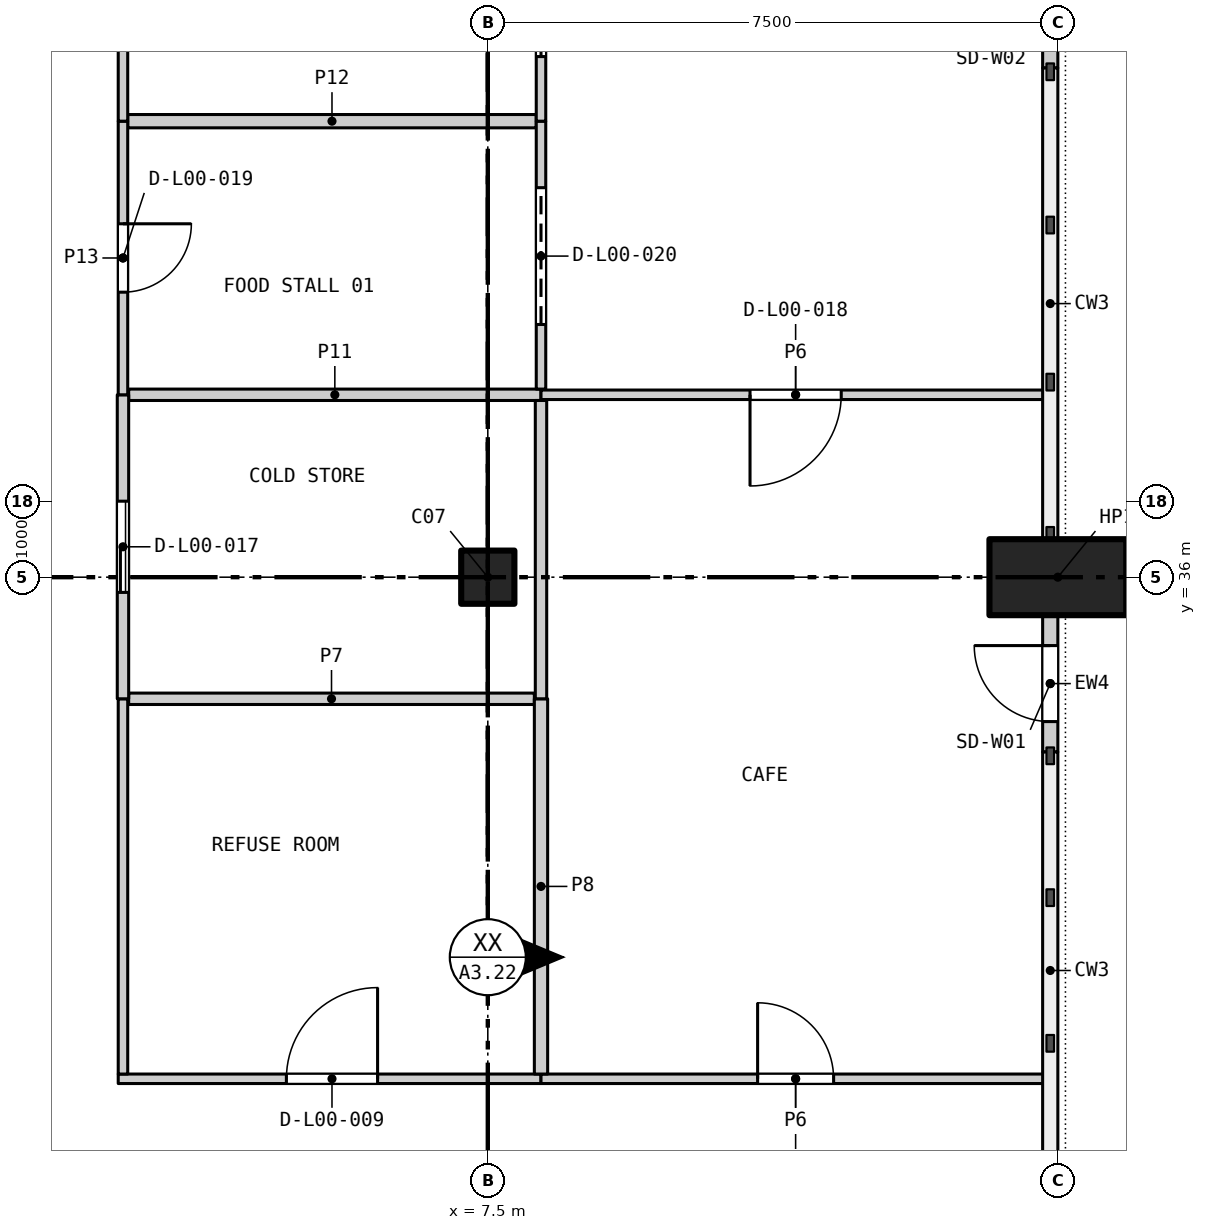
"""IFC4 building model, lengths in metres.
Left out: names, types, materials, properties, quantities, classifications, styles, units other than length and angle.
Written with IfcOpenShell. Run it as: python <this file> out.ifc"""

import sys

from ifc_helpers import new_model, si_unit, direction, frame, frame_2d, origin, origin_2d, place, context, subcontext, project, spatial, rectangle, extrude, element, fill, save


model = new_model("IFC4")
c1 = context("Model", 3, precision=1e-05, world=origin(), true_north=direction((0.0, 1.0)))
c2 = subcontext(c1, "Body", "Model", "MODEL_VIEW")
j1 = project(units=[si_unit("LENGTHUNIT", "METRE"), si_unit("PLANEANGLEUNIT", "RADIAN")], contexts=[c1])
p1 = place(None, origin())
s1 = spatial("IfcSite", under=j1, at=p1, CompositionType="ELEMENT")
p2 = place(p1, origin())
s2 = spatial("IfcBuilding", under=s1, at=p2, CompositionType="ELEMENT")
p3 = place(p2, origin())
s3 = spatial("IfcBuildingStorey", under=s2, at=p3, CompositionType="ELEMENT", Elevation=0.0)
p4 = place(p3, frame((7.5, 36.0, 0.0), z_axis=(0.0, 0.0, 1.0), x_axis=(1.0, 0.0, 0.0)))
e1 = element("IfcColumn", 1, at=p4, inside=s3, PredefinedType="COLUMN", context=c2, shape_type="SweptSolid", body=[
    extrude(rectangle(XDim=0.7, YDim=0.7, at=origin_2d()), origin(), (0.0, 0.0, 1.0), 6.0),
])
p5 = place(p3, frame((15.0, 36.0, 0.0), z_axis=(0.0, 0.0, 1.0), x_axis=(1.0, 0.0, 0.0)))
e2 = element("IfcColumn", 2, at=p5, inside=s3, PredefinedType="COLUMN", context=c2, shape_type="SweptSolid", body=[
    extrude(rectangle(XDim=1.8, YDim=1.0, at=origin_2d()), origin(), (0.0, 0.0, 1.0), 6.0),
])
p6 = place(p3, frame((14.9, 35.5, 0.0), z_axis=(0.0, 0.0, 1.0), x_axis=(0.0, -1.0, 0.0)))
e3 = element("IfcWall", 3, at=p6, inside=s3, PredefinedType="PARTITIONING", context=c2, shape_type="SweptSolid", body=[
    extrude(rectangle(XDim=1.8, YDim=0.2, at=frame_2d((0.9, 0.0))), origin(), (0.0, 0.0, 1.0), 5.8),
])
p7 = place(p6, frame((0.4, 0.0, 0.0)))
e4 = element("IfcOpeningElement", 4, at=p7, cuts=e3, PredefinedType="OPENING", context=c2, shape_type="SweptSolid", body=[
    extrude(rectangle(XDim=1.0, YDim=2.4, at=frame_2d((0.5, 1.2))), frame((0.0, 0.11, 0.0), z_axis=(0.0, -1.0, 0.0), x_axis=(1.0, 0.0, 0.0)), (0.0, 0.0, 1.0), 0.22),
])
p8 = place(p3, frame((14.9, 44.5, 0.0), z_axis=(0.0, 0.0, 1.0), x_axis=(0.0, -1.0, 0.0)))
e5 = element("IfcWall", 5, at=p8, inside=s3, PredefinedType="PARTITIONING", context=c2, shape_type="SweptSolid", body=[
    extrude(rectangle(XDim=1.8, YDim=0.2, at=frame_2d((0.9, 0.0))), origin(), (0.0, 0.0, 1.0), 5.8),
])
p9 = place(p8, frame((0.4, 0.0, 0.0)))
e6 = element("IfcOpeningElement", 6, at=p9, cuts=e5, PredefinedType="OPENING", context=c2, shape_type="SweptSolid", body=[
    extrude(rectangle(XDim=1.0, YDim=2.4, at=frame_2d((0.5, 1.2))), frame((0.0, 0.11, 0.0), z_axis=(0.0, -1.0, 0.0), x_axis=(1.0, 0.0, 0.0)), (0.0, 0.0, 1.0), 0.22),
])
p10 = place(p3, frame((2.637, 29.4, 0.0), z_axis=(0.0, 0.0, 1.0), x_axis=(1.0, 0.0, 0.0)))
e7 = element("IfcWall", 7, at=p10, inside=s3, PredefinedType="PARTITIONING", context=c2, shape_type="SweptSolid", body=[
    extrude(rectangle(XDim=5.562, YDim=0.125, at=frame_2d((2.781, 0.0))), origin(), (0.0, 0.0, 1.0), 5.8),
])
p11 = place(p10, frame((2.212, 0.0, 0.0)))
e8 = element("IfcOpeningElement", 8, at=p11, cuts=e7, PredefinedType="OPENING", context=c2, shape_type="SweptSolid", body=[
    extrude(rectangle(XDim=1.2, YDim=2.1, at=frame_2d((0.6, 1.05))), frame((0.0, 0.073, 0.0), z_axis=(0.0, -1.0, 0.0), x_axis=(1.0, 0.0, 0.0)), (0.0, 0.0, 1.0), 0.145),
])
p12 = place(p3, frame((8.2, 29.4, 0.0), z_axis=(0.0, 0.0, 1.0), x_axis=(1.0, 0.0, 0.0)))
e9 = element("IfcWall", 9, at=p12, inside=s3, PredefinedType="PARTITIONING", context=c2, shape_type="SweptSolid", body=[
    extrude(rectangle(XDim=6.7, YDim=0.125, at=frame_2d((3.35, 0.0))), origin(), (0.0, 0.0, 1.0), 5.8),
])
p13 = place(p12, frame((2.85, 0.0, 0.0)))
e10 = element("IfcOpeningElement", 10, at=p13, cuts=e9, PredefinedType="OPENING", context=c2, shape_type="SweptSolid", body=[
    extrude(rectangle(XDim=1.0, YDim=2.1, at=frame_2d((0.5, 1.05))), frame((0.0, 0.073, 0.0), z_axis=(0.0, -1.0, 0.0), x_axis=(1.0, 0.0, 0.0)), (0.0, 0.0, 1.0), 0.145),
])
p14 = place(p3, frame((2.775, 34.4, 0.0), z_axis=(0.0, 0.0, 1.0), x_axis=(1.0, 0.0, 0.0)))
e11 = element("IfcWall", 11, at=p14, inside=s3, PredefinedType="PARTITIONING", context=c2, shape_type="SweptSolid", body=[
    extrude(rectangle(XDim=5.338, YDim=0.15, at=frame_2d((2.669, 0.0))), origin(), (0.0, 0.0, 1.0), 5.8),
])
p15 = place(p3, frame((2.775, 38.4, 0.0), z_axis=(0.0, 0.0, 1.0), x_axis=(1.0, 0.0, 0.0)))
e12 = element("IfcWall", 12, at=p15, inside=s3, PredefinedType="PARTITIONING", context=c2, shape_type="SweptSolid", body=[
    extrude(rectangle(XDim=5.425, YDim=0.15, at=frame_2d((2.712, 0.0))), origin(), (0.0, 0.0, 1.0), 3.0),
])
p16 = place(p3, frame((8.2, 38.4, 0.0), z_axis=(0.0, 0.0, 1.0), x_axis=(1.0, 0.0, 0.0)))
e13 = element("IfcWall", 13, at=p16, inside=s3, PredefinedType="PARTITIONING", context=c2, shape_type="SweptSolid", body=[
    extrude(rectangle(XDim=6.7, YDim=0.125, at=frame_2d((3.35, 0.0))), origin(), (0.0, 0.0, 1.0), 5.8),
])
p17 = place(p16, frame((2.75, 0.0, 0.0)))
e14 = element("IfcOpeningElement", 14, at=p17, cuts=e13, PredefinedType="OPENING", context=c2, shape_type="SweptSolid", body=[
    extrude(rectangle(XDim=1.2, YDim=2.1, at=frame_2d((0.6, 1.05))), frame((0.0, 0.073, 0.0), z_axis=(0.0, -1.0, 0.0), x_axis=(1.0, 0.0, 0.0)), (0.0, 0.0, 1.0), 0.145),
])
p18 = place(p3, frame((2.762, 42.0, 0.0), z_axis=(0.0, 0.0, 1.0), x_axis=(1.0, 0.0, 0.0)))
e15 = element("IfcWall", 15, at=p18, inside=s3, PredefinedType="PARTITIONING", context=c2, shape_type="SweptSolid", body=[
    extrude(rectangle(XDim=5.375, YDim=0.175, at=frame_2d((2.688, 0.0))), origin(), (0.0, 0.0, 1.0), 3.0),
])
p19 = place(p3, frame((2.7, 29.462, 0.0), z_axis=(0.0, 0.0, 1.0), x_axis=(0.0, 1.0, 0.0)))
e16 = element("IfcWall", 16, at=p19, inside=s3, PredefinedType="PARTITIONING", context=c2, shape_type="SweptSolid", body=[
    extrude(rectangle(XDim=4.938, YDim=0.125, at=frame_2d((2.469, 0.0))), origin(), (0.0, 0.0, 1.0), 5.8),
])
p20 = place(p3, frame((2.7, 34.4, 0.0), z_axis=(0.0, 0.0, 1.0), x_axis=(0.0, 1.0, 0.0)))
e17 = element("IfcWall", 17, at=p20, inside=s3, PredefinedType="PARTITIONING", context=c2, shape_type="SweptSolid", body=[
    extrude(rectangle(XDim=4.0, YDim=0.15, at=frame_2d((2.0, 0.0))), origin(), (0.0, 0.0, 1.0), 5.8),
])
p21 = place(p20, frame((1.4, 0.0, 0.0)))
e18 = element("IfcOpeningElement", 18, at=p21, cuts=e17, PredefinedType="OPENING", context=c2, shape_type="SweptSolid", body=[
    extrude(rectangle(XDim=1.2, YDim=2.4, at=frame_2d((0.6, 1.2))), frame((0.0, 0.085, 0.0), z_axis=(0.0, -1.0, 0.0), x_axis=(1.0, 0.0, 0.0)), (0.0, 0.0, 1.0), 0.17),
])
p22 = place(p3, frame((2.7, 38.4, 0.0), z_axis=(0.0, 0.0, 1.0), x_axis=(0.0, 1.0, 0.0)))
e19 = element("IfcWall", 19, at=p22, inside=s3, PredefinedType="PARTITIONING", context=c2, shape_type="SweptSolid", body=[
    extrude(rectangle(XDim=3.6, YDim=0.125, at=frame_2d((1.8, 0.0))), origin(), (0.0, 0.0, 1.0), 3.0),
])
p23 = place(p22, frame((1.35, 0.0, 0.0)))
e20 = element("IfcOpeningElement", 20, at=p23, cuts=e19, PredefinedType="OPENING", context=c2, shape_type="SweptSolid", body=[
    extrude(rectangle(XDim=0.9, YDim=2.1, at=frame_2d((0.45, 1.05))), frame((0.0, 0.073, 0.0), z_axis=(0.0, -1.0, 0.0), x_axis=(1.0, 0.0, 0.0)), (0.0, 0.0, 1.0), 0.145),
])
p24 = place(p3, frame((2.7, 42.0, 0.0), z_axis=(0.0, 0.0, 1.0), x_axis=(0.0, 1.0, 0.0)))
e21 = element("IfcWall", 21, at=p24, inside=s3, PredefinedType="PARTITIONING", context=c2, shape_type="SweptSolid", body=[
    extrude(rectangle(XDim=3.6, YDim=0.125, at=frame_2d((1.8, 0.0))), origin(), (0.0, 0.0, 1.0), 3.0),
])
p25 = place(p24, frame((1.35, 0.0, 0.0)))
e22 = element("IfcOpeningElement", 22, at=p25, cuts=e21, PredefinedType="OPENING", context=c2, shape_type="SweptSolid", body=[
    extrude(rectangle(XDim=0.9, YDim=2.1, at=frame_2d((0.45, 1.05))), frame((0.0, 0.073, 0.0), z_axis=(0.0, -1.0, 0.0), x_axis=(1.0, 0.0, 0.0)), (0.0, 0.0, 1.0), 0.145),
])
p26 = place(p3, frame((8.2, 29.462, 0.0), z_axis=(0.0, 0.0, 1.0), x_axis=(0.0, 1.0, 0.0)))
e23 = element("IfcWall", 23, at=p26, inside=s3, PredefinedType="PARTITIONING", context=c2, shape_type="SweptSolid", body=[
    extrude(rectangle(XDim=4.938, YDim=0.175, at=frame_2d((2.469, 0.0))), origin(), (0.0, 0.0, 1.0), 5.8),
])
p27 = place(p3, frame((8.2, 34.4, 0.0), z_axis=(0.0, 0.0, 1.0), x_axis=(0.0, 1.0, 0.0)))
e24 = element("IfcWall", 24, at=p27, inside=s3, PredefinedType="PARTITIONING", context=c2, shape_type="SweptSolid", body=[
    extrude(rectangle(XDim=3.925, YDim=0.15, at=frame_2d((1.962, 0.0))), origin(), (0.0, 0.0, 1.0), 5.8),
])
p28 = place(p3, frame((8.2, 38.475, 0.0), z_axis=(0.0, 0.0, 1.0), x_axis=(0.0, 1.0, 0.0)))
e25 = element("IfcWall", 25, at=p28, inside=s3, PredefinedType="PARTITIONING", context=c2, shape_type="SweptSolid", body=[
    extrude(rectangle(XDim=3.525, YDim=0.125, at=frame_2d((1.762, 0.0))), origin(), (0.0, 0.0, 1.0), 3.0),
])
p29 = place(p28, frame((0.85, 0.0, 0.0)))
e26 = element("IfcOpeningElement", 26, at=p29, cuts=e25, PredefinedType="OPENING", context=c2, shape_type="SweptSolid", body=[
    extrude(rectangle(XDim=1.8, YDim=2.4, at=frame_2d((0.9, 1.2))), frame((0.0, 0.073, 0.0), z_axis=(0.0, -1.0, 0.0), x_axis=(1.0, 0.0, 0.0)), (0.0, 0.0, 1.0), 0.145),
])
p30 = place(p3, frame((8.2, 42.0, 0.0), z_axis=(0.0, 0.0, 1.0), x_axis=(0.0, 1.0, 0.0)))
e27 = element("IfcWall", 27, at=p30, inside=s3, PredefinedType="PARTITIONING", context=c2, shape_type="SweptSolid", body=[
    extrude(rectangle(XDim=3.6, YDim=0.125, at=frame_2d((1.8, 0.0))), origin(), (0.0, 0.0, 1.0), 3.0),
])
p31 = place(p30, frame((0.85, 0.0, 0.0)))
e28 = element("IfcOpeningElement", 28, at=p31, cuts=e27, PredefinedType="OPENING", context=c2, shape_type="SweptSolid", body=[
    extrude(rectangle(XDim=1.8, YDim=2.4, at=frame_2d((0.9, 1.2))), frame((0.0, 0.073, 0.0), z_axis=(0.0, -1.0, 0.0), x_axis=(1.0, 0.0, 0.0)), (0.0, 0.0, 1.0), 0.145),
])
p32 = place(p7, frame((1.0, 0.0, 0.0), z_axis=(0.0, 0.0, 1.0), x_axis=(-1.0, 0.0, 0.0)))
e29 = element("IfcDoor", 29, at=p32, inside=s3, OperationType="SINGLE_SWING_RIGHT", PredefinedType="DOOR", context=c2, shape_type="SweptSolid", body=[
    extrude(rectangle(XDim=1.0, YDim=2.4, at=frame_2d((0.5, 1.2))), frame((0.0, 0.025, 0.0), z_axis=(0.0, -1.0, 0.0), x_axis=(1.0, 0.0, 0.0)), (0.0, 0.0, 1.0), 0.05),
])
fill(e4, e29)
p33 = place(p11, origin())
e30 = element("IfcDoor", 30, at=p33, inside=s3, OperationType="SINGLE_SWING_RIGHT", PredefinedType="DOOR", context=c2, shape_type="SweptSolid", body=[
    extrude(rectangle(XDim=1.2, YDim=2.1, at=frame_2d((0.6, 1.05))), frame((0.0, 0.025, 0.0), z_axis=(0.0, -1.0, 0.0), x_axis=(1.0, 0.0, 0.0)), (0.0, 0.0, 1.0), 0.05),
])
fill(e8, e30)
p34 = place(p13, origin())
e31 = element("IfcDoor", 31, at=p34, inside=s3, OperationType="SINGLE_SWING_LEFT", PredefinedType="DOOR", context=c2, shape_type="SweptSolid", body=[
    extrude(rectangle(XDim=1.0, YDim=2.1, at=frame_2d((0.5, 1.05))), frame((0.0, 0.025, 0.0), z_axis=(0.0, -1.0, 0.0), x_axis=(1.0, 0.0, 0.0)), (0.0, 0.0, 1.0), 0.05),
])
fill(e10, e31)
p35 = place(p21, origin())
e32 = element("IfcDoor", 32, at=p35, inside=s3, OperationType="SLIDING_TO_LEFT", PredefinedType="DOOR", context=c2, shape_type="SweptSolid", body=[
    extrude(rectangle(XDim=1.2, YDim=2.4, at=frame_2d((0.6, 1.2))), frame((0.0, 0.025, 0.0), z_axis=(0.0, -1.0, 0.0), x_axis=(1.0, 0.0, 0.0)), (0.0, 0.0, 1.0), 0.05),
])
fill(e18, e32)
p36 = place(p17, frame((1.2, 0.0, 0.0), z_axis=(0.0, 0.0, 1.0), x_axis=(-1.0, 0.0, 0.0)))
e33 = element("IfcDoor", 33, at=p36, inside=s3, OperationType="SINGLE_SWING_RIGHT", PredefinedType="DOOR", context=c2, shape_type="SweptSolid", body=[
    extrude(rectangle(XDim=1.2, YDim=2.1, at=frame_2d((0.6, 1.05))), frame((0.0, 0.025, 0.0), z_axis=(0.0, -1.0, 0.0), x_axis=(1.0, 0.0, 0.0)), (0.0, 0.0, 1.0), 0.05),
])
fill(e14, e33)
p37 = place(p23, frame((0.9, 0.0, 0.0), z_axis=(0.0, 0.0, 1.0), x_axis=(-1.0, 0.0, 0.0)))
e34 = element("IfcDoor", 34, at=p37, inside=s3, OperationType="SINGLE_SWING_LEFT", PredefinedType="DOOR", context=c2, shape_type="SweptSolid", body=[
    extrude(rectangle(XDim=0.9, YDim=2.1, at=frame_2d((0.45, 1.05))), frame((0.0, 0.025, 0.0), z_axis=(0.0, -1.0, 0.0), x_axis=(1.0, 0.0, 0.0)), (0.0, 0.0, 1.0), 0.05),
])
fill(e20, e34)
p38 = place(p29, origin())
e35 = element("IfcDoor", 35, at=p38, inside=s3, OperationType="ROLLINGUP", PredefinedType="DOOR", context=c2, shape_type="SweptSolid", body=[
    extrude(rectangle(XDim=1.8, YDim=2.4, at=frame_2d((0.9, 1.2))), frame((0.0, 0.025, 0.0), z_axis=(0.0, -1.0, 0.0), x_axis=(1.0, 0.0, 0.0)), (0.0, 0.0, 1.0), 0.05),
])
fill(e26, e35)
p39 = place(p31, origin())
e36 = element("IfcDoor", 36, at=p39, inside=s3, OperationType="ROLLINGUP", PredefinedType="DOOR", context=c2, shape_type="SweptSolid", body=[
    extrude(rectangle(XDim=1.8, YDim=2.4, at=frame_2d((0.9, 1.2))), frame((0.0, 0.025, 0.0), z_axis=(0.0, -1.0, 0.0), x_axis=(1.0, 0.0, 0.0)), (0.0, 0.0, 1.0), 0.05),
])
fill(e28, e36)
save(model, sys.argv[1])
